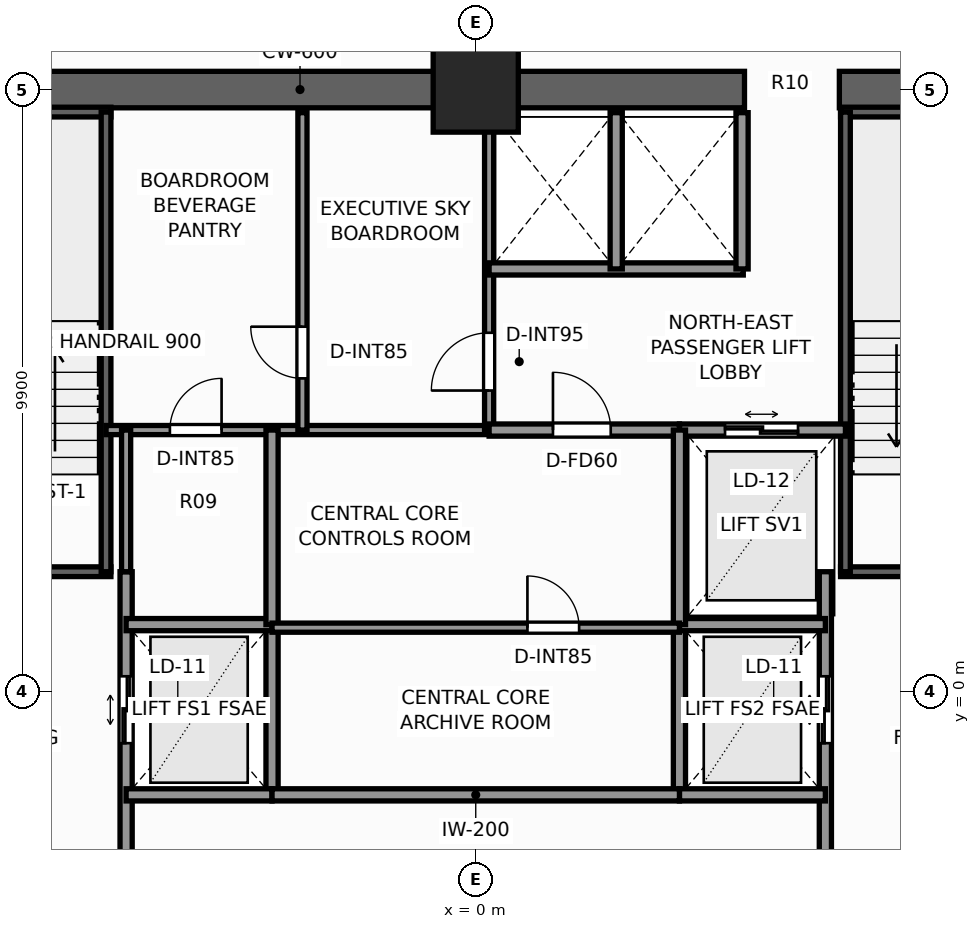
"""IFC4 building model, lengths in metres.
Left out: names, types, materials, properties, quantities, classifications, styles, units other than length and angle.
Written with IfcOpenShell. Run it as: python <this file> out.ifc"""

import sys

from ifc_helpers import new_model, si_unit, direction, frame, frame_2d, origin, origin_2d, place, context, subcontext, project, spatial, rectangle, extrude, element, fill, save


model = new_model("IFC4")
c1 = context("Model", 3, precision=1e-05, world=origin(), true_north=direction((0.0, 1.0)))
c2 = subcontext(c1, "Body", "Model", "MODEL_VIEW")
j1 = project(units=[si_unit("LENGTHUNIT", "METRE"), si_unit("PLANEANGLEUNIT", "RADIAN")], contexts=[c1])
p1 = place(None, origin())
s1 = spatial("IfcSite", under=j1, at=p1, CompositionType="ELEMENT")
p2 = place(p1, origin())
s2 = spatial("IfcBuilding", under=s1, at=p2, CompositionType="ELEMENT")
p3 = place(p2, frame((0.0, 0.0, 78.8)))
s3 = spatial("IfcBuildingStorey", under=s2, at=p3, CompositionType="ELEMENT", Elevation=78.8)
p4 = place(p3, frame((-10.2, 9.9, 0.0), z_axis=(0.0, 0.0, 1.0), x_axis=(1.0, 0.0, 0.0)))
e1 = element("IfcWall", 1, at=p4, inside=s3, PredefinedType="SHEAR", context=c2, shape_type="SweptSolid", body=[
    extrude(rectangle(XDim=14.62, YDim=0.6, at=frame_2d((7.31, 0.0))), origin(), (0.0, 0.0, 1.0), 3.3),
])
p5 = place(p3, frame((5.98, 9.9, 0.0), z_axis=(0.0, 0.0, 1.0), x_axis=(1.0, 0.0, 0.0)))
e2 = element("IfcWall", 2, at=p5, inside=s3, PredefinedType="SHEAR", context=c2, shape_type="SweptSolid", body=[
    extrude(rectangle(XDim=4.22, YDim=0.6, at=frame_2d((2.11, 0.0))), origin(), (0.0, 0.0, 1.0), 3.3),
])
p6 = place(p3, frame((0.0, 9.9, 0.0), z_axis=(0.0, 0.0, 1.0), x_axis=(1.0, 0.0, 0.0)))
e3 = element("IfcColumn", 3, at=p6, inside=s3, PredefinedType="COLUMN", context=c2, shape_type="SweptSolid", body=[
    extrude(rectangle(XDim=1.4, YDim=1.4, at=origin_2d()), origin(), (0.0, 0.0, 1.0), 3.3),
])
p7 = place(p3, frame((-9.52, 1.97, 0.0), z_axis=(0.0, 0.0, 1.0), x_axis=(1.0, 0.0, 0.0)))
e4 = element("IfcWall", 4, at=p7, inside=s3, PredefinedType="SHEAR", context=c2, shape_type="SweptSolid", body=[
    extrude(rectangle(XDim=3.52, YDim=0.16, at=frame_2d((1.76, 0.0))), origin(), (0.0, 0.0, 1.0), 3.3),
])
p8 = place(p7, frame((1.15, 0.0, 0.0)))
e5 = element("IfcOpeningElement", 5, at=p8, cuts=e4, PredefinedType="OPENING", context=c2, shape_type="SweptSolid", body=[
    extrude(rectangle(XDim=1.1, YDim=2.2, at=frame_2d((0.55, 1.1))), frame((0.0, 0.09, 0.0), z_axis=(0.0, -1.0, 0.0), x_axis=(1.0, 0.0, 0.0)), (0.0, 0.0, 1.0), 0.18),
])
p9 = place(p3, frame((-9.52, 9.53, 0.0), z_axis=(0.0, 0.0, 1.0), x_axis=(1.0, 0.0, 0.0)))
e6 = element("IfcWall", 6, at=p9, inside=s3, PredefinedType="SHEAR", context=c2, shape_type="SweptSolid", body=[
    extrude(rectangle(XDim=3.52, YDim=0.16, at=frame_2d((1.76, 0.0))), origin(), (0.0, 0.0, 1.0), 3.3),
])
p10 = place(p3, frame((-6.08, 1.97, 0.0), z_axis=(0.0, 0.0, 1.0), x_axis=(0.0, 1.0, 0.0)))
e7 = element("IfcWall", 7, at=p10, inside=s3, PredefinedType="SHEAR", context=c2, shape_type="SweptSolid", body=[
    extrude(rectangle(XDim=7.56, YDim=0.16, at=frame_2d((3.78, 0.0))), origin(), (0.0, 0.0, 1.0), 3.3),
])
p11 = place(p3, frame((6.0, 1.97, 0.0), z_axis=(0.0, 0.0, 1.0), x_axis=(1.0, 0.0, 0.0)))
e8 = element("IfcWall", 8, at=p11, inside=s3, PredefinedType="SHEAR", context=c2, shape_type="SweptSolid", body=[
    extrude(rectangle(XDim=3.52, YDim=0.16, at=frame_2d((1.76, 0.0))), origin(), (0.0, 0.0, 1.0), 3.3),
])
p12 = place(p11, frame((1.15, 0.0, 0.0)))
e9 = element("IfcOpeningElement", 9, at=p12, cuts=e8, PredefinedType="OPENING", context=c2, shape_type="SweptSolid", body=[
    extrude(rectangle(XDim=1.1, YDim=2.2, at=frame_2d((0.55, 1.1))), frame((0.0, 0.09, 0.0), z_axis=(0.0, -1.0, 0.0), x_axis=(1.0, 0.0, 0.0)), (0.0, 0.0, 1.0), 0.18),
])
p13 = place(p3, frame((6.0, 9.53, 0.0), z_axis=(0.0, 0.0, 1.0), x_axis=(1.0, 0.0, 0.0)))
e10 = element("IfcWall", 10, at=p13, inside=s3, PredefinedType="SHEAR", context=c2, shape_type="SweptSolid", body=[
    extrude(rectangle(XDim=3.52, YDim=0.16, at=frame_2d((1.76, 0.0))), origin(), (0.0, 0.0, 1.0), 3.3),
])
p14 = place(p3, frame((6.08, 1.97, 0.0), z_axis=(0.0, 0.0, 1.0), x_axis=(0.0, 1.0, 0.0)))
e11 = element("IfcWall", 11, at=p14, inside=s3, PredefinedType="SHEAR", context=c2, shape_type="SweptSolid", body=[
    extrude(rectangle(XDim=7.56, YDim=0.16, at=frame_2d((3.78, 0.0))), origin(), (0.0, 0.0, 1.0), 3.3),
])
p15 = place(p3, frame((-5.75, -3.6, 0.0), z_axis=(0.0, 0.0, 1.0), x_axis=(0.0, 1.0, 0.0)))
e12 = element("IfcWall", 12, at=p15, inside=s3, PredefinedType="SOLIDWALL", context=c2, shape_type="SweptSolid", body=[
    extrude(rectangle(XDim=5.57, YDim=0.2, at=frame_2d((2.785, 0.0))), origin(), (0.0, 0.0, 1.0), 3.08),
])
p16 = place(p15, frame((2.75, 0.0, 0.0)))
e13 = element("IfcOpeningElement", 13, at=p16, cuts=e12, PredefinedType="OPENING", context=c2, shape_type="SweptSolid", body=[
    extrude(rectangle(XDim=1.1, YDim=2.2, at=frame_2d((0.55, 1.1))), frame((0.0, 0.11, 0.0), z_axis=(0.0, -1.0, 0.0), x_axis=(1.0, 0.0, 0.0)), (0.0, 0.0, 1.0), 0.22),
])
p17 = place(p3, frame((-3.35, -1.7, 0.0), z_axis=(0.0, 0.0, 1.0), x_axis=(0.0, 1.0, 0.0)))
e14 = element("IfcWall", 14, at=p17, inside=s3, PredefinedType="SOLIDWALL", context=c2, shape_type="SweptSolid", body=[
    extrude(rectangle(XDim=2.8, YDim=0.2, at=frame_2d((1.4, 0.0))), origin(), (0.0, 0.0, 1.0), 3.08),
])
for number, where, z_axis, x_axis in (
    (15, (-5.75, -1.7, 0.0), (0.0, 0.0, 1.0), (1.0, 0.0, 0.0)),
    (16, (-5.75, 1.1, 0.0), (0.0, 0.0, 1.0), (1.0, 0.0, 0.0)),
):
    element("IfcWall", number, at=place(p3, frame(where, z_axis=z_axis, x_axis=x_axis)), inside=s3, PredefinedType="SOLIDWALL", context=c2, shape_type="SweptSolid", body=[
        extrude(rectangle(XDim=2.4, YDim=0.2, at=frame_2d((1.2, 0.0))), origin(), (0.0, 0.0, 1.0), 3.08),
    ])
p18 = place(p3, frame((5.75, -3.6, 0.0), z_axis=(0.0, 0.0, 1.0), x_axis=(0.0, 1.0, 0.0)))
e17 = element("IfcWall", 17, at=p18, inside=s3, PredefinedType="SOLIDWALL", context=c2, shape_type="SweptSolid", body=[
    extrude(rectangle(XDim=5.57, YDim=0.2, at=frame_2d((2.785, 0.0))), origin(), (0.0, 0.0, 1.0), 3.08),
])
p19 = place(p18, frame((2.75, 0.0, 0.0)))
e18 = element("IfcOpeningElement", 18, at=p19, cuts=e17, PredefinedType="OPENING", context=c2, shape_type="SweptSolid", body=[
    extrude(rectangle(XDim=1.1, YDim=2.2, at=frame_2d((0.55, 1.1))), frame((0.0, 0.11, 0.0), z_axis=(0.0, -1.0, 0.0), x_axis=(1.0, 0.0, 0.0)), (0.0, 0.0, 1.0), 0.22),
])
p20 = place(p3, frame((3.35, -1.7, 0.0), z_axis=(0.0, 0.0, 1.0), x_axis=(0.0, 1.0, 0.0)))
e19 = element("IfcWall", 19, at=p20, inside=s3, PredefinedType="SOLIDWALL", context=c2, shape_type="SweptSolid", body=[
    extrude(rectangle(XDim=2.8, YDim=0.2, at=frame_2d((1.4, 0.0))), origin(), (0.0, 0.0, 1.0), 3.08),
])
for number, where, z_axis, x_axis in (
    (20, (3.35, -1.7, 0.0), (0.0, 0.0, 1.0), (1.0, 0.0, 0.0)),
    (21, (3.35, 1.1, 0.0), (0.0, 0.0, 1.0), (1.0, 0.0, 0.0)),
):
    element("IfcWall", number, at=place(p3, frame(where, z_axis=z_axis, x_axis=x_axis)), inside=s3, PredefinedType="SOLIDWALL", context=c2, shape_type="SweptSolid", body=[
        extrude(rectangle(XDim=2.4, YDim=0.2, at=frame_2d((1.2, 0.0))), origin(), (0.0, 0.0, 1.0), 3.08),
    ])
p21 = place(p3, frame((3.35, 4.3, 0.0), z_axis=(0.0, 0.0, 1.0), x_axis=(1.0, 0.0, 0.0)))
e22 = element("IfcWall", 22, at=p21, inside=s3, PredefinedType="SOLIDWALL", context=c2, shape_type="SweptSolid", body=[
    extrude(rectangle(XDim=2.73, YDim=0.2, at=frame_2d((1.365, 0.0))), origin(), (0.0, 0.0, 1.0), 3.08),
])
p22 = place(p21, frame((0.75, 0.0, 0.0)))
e23 = element("IfcOpeningElement", 23, at=p22, cuts=e22, PredefinedType="OPENING", context=c2, shape_type="SweptSolid", body=[
    extrude(rectangle(XDim=1.2, YDim=2.25, at=frame_2d((0.6, 1.125))), frame((0.0, 0.11, 0.0), z_axis=(0.0, -1.0, 0.0), x_axis=(1.0, 0.0, 0.0)), (0.0, 0.0, 1.0), 0.22),
])
p23 = place(p3, frame((-6.08, 4.3, 0.0), z_axis=(0.0, 0.0, 1.0), x_axis=(1.0, 0.0, 0.0)))
e24 = element("IfcWall", 24, at=p23, inside=s3, PredefinedType="PARTITIONING", context=c2, shape_type="SweptSolid", body=[
    extrude(rectangle(XDim=6.3, YDim=0.15, at=frame_2d((3.15, 0.0))), origin(), (0.0, 0.0, 1.0), 3.08),
])
p24 = place(p23, frame((1.05, 0.0, 0.0)))
e25 = element("IfcOpeningElement", 25, at=p24, cuts=e24, PredefinedType="OPENING", context=c2, shape_type="SweptSolid", body=[
    extrude(rectangle(XDim=0.85, YDim=2.03, at=frame_2d((0.425, 1.015))), frame((0.0, 0.085, 0.0), z_axis=(0.0, -1.0, 0.0), x_axis=(1.0, 0.0, 0.0)), (0.0, 0.0, 1.0), 0.17),
])
p25 = place(p3, frame((0.22, 4.3, 0.0), z_axis=(0.0, 0.0, 1.0), x_axis=(0.0, 1.0, 0.0)))
e26 = element("IfcWall", 26, at=p25, inside=s3, PredefinedType="PARTITIONING", context=c2, shape_type="SweptSolid", body=[
    extrude(rectangle(XDim=5.22, YDim=0.15, at=frame_2d((2.61, 0.0))), origin(), (0.0, 0.0, 1.0), 3.08),
])
p26 = place(p25, frame((0.65, 0.0, 0.0)))
e27 = element("IfcOpeningElement", 27, at=p26, cuts=e26, PredefinedType="OPENING", context=c2, shape_type="SweptSolid", body=[
    extrude(rectangle(XDim=0.95, YDim=2.06, at=frame_2d((0.475, 1.03))), frame((0.0, 0.085, 0.0), z_axis=(0.0, -1.0, 0.0), x_axis=(1.0, 0.0, 0.0)), (0.0, 0.0, 1.0), 0.17),
])
p27 = place(p3, frame((-2.85, 4.3, 0.0), z_axis=(0.0, 0.0, 1.0), x_axis=(0.0, 1.0, 0.0)))
e28 = element("IfcWall", 28, at=p27, inside=s3, PredefinedType="PARTITIONING", context=c2, shape_type="SweptSolid", body=[
    extrude(rectangle(XDim=5.22, YDim=0.15, at=frame_2d((2.61, 0.0))), origin(), (0.0, 0.0, 1.0), 3.08),
])
p28 = place(p27, frame((0.85, 0.0, 0.0)))
e29 = element("IfcOpeningElement", 29, at=p28, cuts=e28, PredefinedType="OPENING", context=c2, shape_type="SweptSolid", body=[
    extrude(rectangle(XDim=0.85, YDim=2.03, at=frame_2d((0.425, 1.015))), frame((0.0, 0.085, 0.0), z_axis=(0.0, -1.0, 0.0), x_axis=(1.0, 0.0, 0.0)), (0.0, 0.0, 1.0), 0.17),
])
p29 = place(p3, frame((0.22, 6.95, 0.0), z_axis=(0.0, 0.0, 1.0), x_axis=(1.0, 0.0, 0.0)))
e30 = element("IfcWall", 30, at=p29, inside=s3, PredefinedType="SOLIDWALL", context=c2, shape_type="SweptSolid", body=[
    extrude(rectangle(XDim=4.18, YDim=0.2, at=frame_2d((2.09, 0.0))), origin(), (0.0, 0.0, 1.0), 3.08),
])
for number, where, z_axis, x_axis in (
    (31, (4.38, 6.95, 0.0), (0.0, 0.0, 1.0), (0.0, 1.0, 0.0)),
    (32, (2.31, 6.95, 0.0), (0.0, 0.0, 1.0), (0.0, 1.0, 0.0)),
):
    element("IfcWall", number, at=place(p3, frame(where, z_axis=z_axis, x_axis=x_axis)), inside=s3, PredefinedType="SOLIDWALL", context=c2, shape_type="SweptSolid", body=[
        extrude(rectangle(XDim=2.57, YDim=0.2, at=frame_2d((1.285, 0.0))), origin(), (0.0, 0.0, 1.0), 3.08),
    ])
p30 = place(p3, frame((0.22, 4.3, 0.0), z_axis=(0.0, 0.0, 1.0), x_axis=(1.0, 0.0, 0.0)))
e33 = element("IfcWall", 33, at=p30, inside=s3, PredefinedType="SOLIDWALL", context=c2, shape_type="SweptSolid", body=[
    extrude(rectangle(XDim=3.13, YDim=0.2, at=frame_2d((1.565, 0.0))), origin(), (0.0, 0.0, 1.0), 3.08),
])
p31 = place(p30, frame((1.05, 0.0, 0.0)))
e34 = element("IfcOpeningElement", 34, at=p31, cuts=e33, PredefinedType="OPENING", context=c2, shape_type="SweptSolid", body=[
    extrude(rectangle(XDim=0.95, YDim=2.06, at=frame_2d((0.475, 1.03))), frame((0.0, 0.11, 0.0), z_axis=(0.0, -1.0, 0.0), x_axis=(1.0, 0.0, 0.0)), (0.0, 0.0, 1.0), 0.22),
])
p32 = place(p3, frame((-3.35, -1.7, 0.0), z_axis=(0.0, 0.0, 1.0), x_axis=(1.0, 0.0, 0.0)))
e35 = element("IfcWall", 35, at=p32, inside=s3, PredefinedType="SOLIDWALL", context=c2, shape_type="SweptSolid", body=[
    extrude(rectangle(XDim=6.7, YDim=0.2, at=frame_2d((3.35, 0.0))), origin(), (0.0, 0.0, 1.0), 3.08),
])
for number, where, z_axis, x_axis in (
    (36, (-3.35, 1.1, 0.0), (0.0, 0.0, 1.0), (0.0, 1.0, 0.0)),
    (37, (3.35, 1.1, 0.0), (0.0, 0.0, 1.0), (0.0, 1.0, 0.0)),
):
    element("IfcWall", number, at=place(p3, frame(where, z_axis=z_axis, x_axis=x_axis)), inside=s3, PredefinedType="SOLIDWALL", context=c2, shape_type="SweptSolid", body=[
        extrude(rectangle(XDim=3.2, YDim=0.2, at=frame_2d((1.6, 0.0))), origin(), (0.0, 0.0, 1.0), 3.08),
    ])
p33 = place(p3, frame((-3.35, 1.05, 0.0), z_axis=(0.0, 0.0, 1.0), x_axis=(1.0, 0.0, 0.0)))
e38 = element("IfcWall", 38, at=p33, inside=s3, PredefinedType="PARTITIONING", context=c2, shape_type="SweptSolid", body=[
    extrude(rectangle(XDim=6.7, YDim=0.15, at=frame_2d((3.35, 0.0))), origin(), (0.0, 0.0, 1.0), 3.08),
])
p34 = place(p33, frame((4.2, 0.0, 0.0)))
e39 = element("IfcOpeningElement", 39, at=p34, cuts=e38, PredefinedType="OPENING", context=c2, shape_type="SweptSolid", body=[
    extrude(rectangle(XDim=0.85, YDim=2.03, at=frame_2d((0.425, 1.015))), frame((0.0, 0.085, 0.0), z_axis=(0.0, -1.0, 0.0), x_axis=(1.0, 0.0, 0.0)), (0.0, 0.0, 1.0), 0.17),
])
p35 = place(p3, frame((-5.75, 1.97, 0.0), z_axis=(0.0, 0.0, 1.0), x_axis=(0.0, 1.0, 0.0)))
e40 = element("IfcWall", 40, at=p35, inside=s3, PredefinedType="PARTITIONING", context=c2, shape_type="SweptSolid", body=[
    extrude(rectangle(XDim=2.33, YDim=0.15, at=frame_2d((1.165, 0.0))), origin(), (0.0, 0.0, 1.0), 3.08),
])
p36 = place(p16, origin())
e41 = element("IfcDoor", 41, at=p36, inside=s3, OperationType="DOUBLE_DOOR_SLIDING", PredefinedType="DOOR", context=c2, shape_type="SweptSolid", body=[
    extrude(rectangle(XDim=1.1, YDim=2.2, at=frame_2d((0.55, 1.1))), frame((0.0, 0.025, 0.0), z_axis=(0.0, -1.0, 0.0), x_axis=(1.0, 0.0, 0.0)), (0.0, 0.0, 1.0), 0.05),
])
fill(e13, e41)
p37 = place(p19, origin())
e42 = element("IfcDoor", 42, at=p37, inside=s3, OperationType="DOUBLE_DOOR_SLIDING", PredefinedType="DOOR", context=c2, shape_type="SweptSolid", body=[
    extrude(rectangle(XDim=1.1, YDim=2.2, at=frame_2d((0.55, 1.1))), frame((0.0, 0.025, 0.0), z_axis=(0.0, -1.0, 0.0), x_axis=(1.0, 0.0, 0.0)), (0.0, 0.0, 1.0), 0.05),
])
fill(e18, e42)
p38 = place(p22, origin())
e43 = element("IfcDoor", 43, at=p38, inside=s3, OperationType="DOUBLE_DOOR_SLIDING", PredefinedType="DOOR", context=c2, shape_type="SweptSolid", body=[
    extrude(rectangle(XDim=1.2, YDim=2.25, at=frame_2d((0.6, 1.125))), frame((0.0, 0.025, 0.0), z_axis=(0.0, -1.0, 0.0), x_axis=(1.0, 0.0, 0.0)), (0.0, 0.0, 1.0), 0.05),
])
fill(e23, e43)
p39 = place(p26, origin())
e44 = element("IfcDoor", 44, at=p39, inside=s3, OperationType="SINGLE_SWING_LEFT", PredefinedType="DOOR", context=c2, shape_type="SweptSolid", body=[
    extrude(rectangle(XDim=0.95, YDim=2.06, at=frame_2d((0.475, 1.03))), frame((0.0, 0.025, 0.0), z_axis=(0.0, -1.0, 0.0), x_axis=(1.0, 0.0, 0.0)), (0.0, 0.0, 1.0), 0.05),
])
fill(e27, e44)
p40 = place(p28, origin())
e45 = element("IfcDoor", 45, at=p40, inside=s3, OperationType="SINGLE_SWING_RIGHT", PredefinedType="DOOR", context=c2, shape_type="SweptSolid", body=[
    extrude(rectangle(XDim=0.85, YDim=2.03, at=frame_2d((0.425, 1.015))), frame((0.0, 0.025, 0.0), z_axis=(0.0, -1.0, 0.0), x_axis=(1.0, 0.0, 0.0)), (0.0, 0.0, 1.0), 0.05),
])
fill(e29, e45)
p41 = place(p31, origin())
e46 = element("IfcDoor", 46, at=p41, inside=s3, OperationType="SINGLE_SWING_LEFT", PredefinedType="DOOR", context=c2, shape_type="SweptSolid", body=[
    extrude(rectangle(XDim=0.95, YDim=2.06, at=frame_2d((0.475, 1.03))), frame((0.0, 0.025, 0.0), z_axis=(0.0, -1.0, 0.0), x_axis=(1.0, 0.0, 0.0)), (0.0, 0.0, 1.0), 0.05),
])
fill(e34, e46)
p42 = place(p34, origin())
e47 = element("IfcDoor", 47, at=p42, inside=s3, OperationType="SINGLE_SWING_LEFT", PredefinedType="DOOR", context=c2, shape_type="SweptSolid", body=[
    extrude(rectangle(XDim=0.85, YDim=2.03, at=frame_2d((0.425, 1.015))), frame((0.0, 0.025, 0.0), z_axis=(0.0, -1.0, 0.0), x_axis=(1.0, 0.0, 0.0)), (0.0, 0.0, 1.0), 0.05),
])
fill(e39, e47)
p43 = place(p24, origin())
e48 = element("IfcDoor", 48, at=p43, inside=s3, OperationType="SINGLE_SWING_RIGHT", PredefinedType="DOOR", context=c2, shape_type="SweptSolid", body=[
    extrude(rectangle(XDim=0.85, YDim=2.03, at=frame_2d((0.425, 1.015))), frame((0.0, 0.025, 0.0), z_axis=(0.0, -1.0, 0.0), x_axis=(1.0, 0.0, 0.0)), (0.0, 0.0, 1.0), 0.05),
])
fill(e25, e48)
save(model, sys.argv[1])
